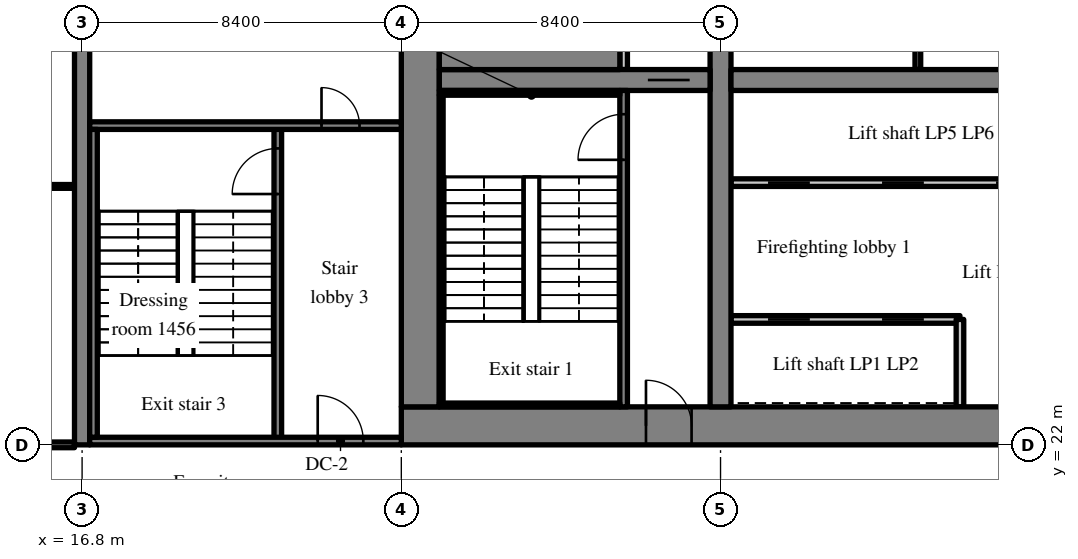
"""IFC4 building model, lengths in metres.
Left out: names, types, materials, properties, quantities, classifications, styles, units other than length and angle.
Written with IfcOpenShell. Run it as: python <this file> out.ifc"""

import sys

from ifc_helpers import new_model, si_unit, direction, frame, frame_2d, origin, place, context, subcontext, project, spatial, rectangle, extrude, source, transform, mapped, element, fill, save


model = new_model("IFC4")
c1 = context("Model", 3, precision=1e-05, world=origin(), true_north=direction((0.0, 1.0)))
c2 = subcontext(c1, "Body", "Model", "MODEL_VIEW")
j1 = project(units=[si_unit("LENGTHUNIT", "METRE"), si_unit("PLANEANGLEUNIT", "RADIAN")], contexts=[c1])
p1 = place(None, origin())
s1 = spatial("IfcSite", under=j1, at=p1, CompositionType="ELEMENT")
p2 = place(p1, origin())
s2 = spatial("IfcBuilding", under=s1, at=p2, CompositionType="ELEMENT")
p3 = place(p2, frame((0.0, 0.0, 62.0)))
s3 = spatial("IfcBuildingStorey", under=s2, at=p3, CompositionType="ELEMENT", Elevation=62.0)
m1 = source(origin(), c2, "Body", "SweptSolid", [
    extrude(rectangle(XDim=50.4, YDim=1.0, at=frame_2d((25.2, 0.0))), origin(), (0.0, 0.0, 1.0), 3.52),
])
p4 = place(p3, frame((25.2, 22.5, 0.0), z_axis=(0.0, 0.0, 1.0), x_axis=(1.0, 0.0, 0.0)))
e1 = element("IfcWall", 1, at=p4, inside=s3, PredefinedType="SHEAR", context=c2, shape_type="MappedRepresentation", body=[
    mapped(m1, transform((0.0, 0.0, 0.0), scale=1.0)),
])
m2 = source(origin(), c2, "Body", "SweptSolid", [
    extrude(rectangle(XDim=1.8, YDim=2.1, at=frame_2d((0.9, 1.05))), frame((0.0, 0.51, 0.0), z_axis=(0.0, -1.0, 0.0), x_axis=(1.0, 0.0, 0.0)), (0.0, 0.0, 1.0), 1.02),
])
p5 = place(p4, frame((15.9, 0.0, 0.0)))
e2 = element("IfcOpeningElement", 2, at=p5, cuts=e1, PredefinedType="OPENING", context=c2, shape_type="MappedRepresentation", body=[
    mapped(m2, transform((0.0, 0.0, 0.0), scale=1.0)),
])
m3 = source(origin(), c2, "Body", "SweptSolid", [
    extrude(rectangle(XDim=1.2, YDim=2.1, at=frame_2d((0.6, 1.05))), frame((0.0, 0.51, 0.0), z_axis=(0.0, -1.0, 0.0), x_axis=(1.0, 0.0, 0.0)), (0.0, 0.0, 1.0), 1.02),
])
p6 = place(p4, frame((26.987, 0.0, 0.0)))
e3 = element("IfcOpeningElement", 3, at=p6, cuts=e1, PredefinedType="OPENING", context=c2, shape_type="MappedRepresentation", body=[
    mapped(m3, transform((0.0, 0.0, 0.0), scale=1.0)),
])
m4 = source(origin(), c2, "Body", "SweptSolid", [
    extrude(rectangle(XDim=0.9, YDim=2.1, at=frame_2d((0.45, 1.05))), frame((0.0, 0.51, 0.0), z_axis=(0.0, -1.0, 0.0), x_axis=(1.0, 0.0, 0.0)), (0.0, 0.0, 1.0), 1.02),
])
p7 = place(p4, frame((34.5, 0.0, 0.0)))
e4 = element("IfcOpeningElement", 4, at=p7, cuts=e1, PredefinedType="OPENING", context=c2, shape_type="MappedRepresentation", body=[
    mapped(m4, transform((0.0, 0.0, 0.0), scale=1.0)),
])
p8 = place(p4, frame((31.5, 0.0, 0.0)))
e5 = element("IfcOpeningElement", 5, at=p8, cuts=e1, PredefinedType="OPENING", context=c2, shape_type="MappedRepresentation", body=[
    mapped(m4, transform((0.0, 0.0, 0.0), scale=1.0)),
])
p9 = place(p4, frame((39.769, 0.0, 0.0)))
e6 = element("IfcOpeningElement", 6, at=p9, cuts=e1, PredefinedType="OPENING", context=c2, shape_type="MappedRepresentation", body=[
    mapped(m4, transform((0.0, 0.0, 0.0), scale=1.0)),
])
p10 = place(p4, frame((36.756, 0.0, 0.0)))
e7 = element("IfcOpeningElement", 7, at=p10, cuts=e1, PredefinedType="OPENING", context=c2, shape_type="MappedRepresentation", body=[
    mapped(m4, transform((0.0, 0.0, 0.0), scale=1.0)),
])
p11 = place(p4, frame((6.438, 0.0, 0.0)))
e8 = element("IfcOpeningElement", 8, at=p11, cuts=e1, PredefinedType="OPENING", context=c2, shape_type="MappedRepresentation", body=[
    mapped(m3, transform((0.0, 0.0, 0.0), scale=1.0)),
])
p12 = place(p4, frame((47.725, 0.0, 0.0)))
e9 = element("IfcOpeningElement", 9, at=p12, cuts=e1, PredefinedType="OPENING", context=c2, shape_type="MappedRepresentation", body=[
    mapped(m3, transform((0.0, 0.0, 0.0), scale=1.0)),
])
m5 = source(origin(), c2, "Body", "SweptSolid", [
    extrude(rectangle(XDim=18.0, YDim=1.0, at=frame_2d((9.0, 0.0))), origin(), (0.0, 0.0, 1.0), 3.52),
])
p13 = place(p3, frame((25.7, 23.0, 0.0), z_axis=(0.0, 0.0, 1.0), x_axis=(0.0, 1.0, 0.0)))
e10 = element("IfcWall", 10, at=p13, inside=s3, PredefinedType="SHEAR", context=c2, shape_type="MappedRepresentation", body=[
    mapped(m5, transform((0.0, 0.0, 0.0), scale=1.0)),
])
m6 = source(origin(), c2, "Body", "SweptSolid", [
    extrude(rectangle(XDim=18.0, YDim=0.55, at=frame_2d((9.0, 0.0))), origin(), (0.0, 0.0, 1.0), 3.52),
])
p14 = place(p3, frame((33.6, 23.0, 0.0), z_axis=(0.0, 0.0, 1.0), x_axis=(0.0, 1.0, 0.0)))
e11 = element("IfcWall", 11, at=p14, inside=s3, PredefinedType="SHEAR", context=c2, shape_type="MappedRepresentation", body=[
    mapped(m6, transform((0.0, 0.0, 0.0), scale=1.0)),
])
m7 = source(origin(), c2, "Body", "SweptSolid", [
    extrude(rectangle(XDim=1.1, YDim=2.1, at=frame_2d((0.55, 1.05))), frame((0.0, 0.285, 0.0), z_axis=(0.0, -1.0, 0.0), x_axis=(1.0, 0.0, 0.0)), (0.0, 0.0, 1.0), 0.57),
])
p15 = place(p14, frame((12.45, 0.0, 0.0)))
e12 = element("IfcOpeningElement", 12, at=p15, cuts=e11, PredefinedType="OPENING", context=c2, shape_type="MappedRepresentation", body=[
    mapped(m7, transform((0.0, 0.0, 0.0), scale=1.0)),
])
m8 = source(origin(), c2, "Body", "SweptSolid", [
    extrude(rectangle(XDim=7.125, YDim=0.55, at=frame_2d((3.562, 0.0))), origin(), (0.0, 0.0, 1.0), 3.52),
])
p16 = place(p3, frame((26.2, 31.6, 0.0), z_axis=(0.0, 0.0, 1.0), x_axis=(1.0, 0.0, 0.0)))
e13 = element("IfcWall", 13, at=p16, inside=s3, PredefinedType="SHEAR", context=c2, shape_type="MappedRepresentation", body=[
    mapped(m8, transform((0.0, 0.0, 0.0), scale=1.0)),
])
p17 = place(p16, frame((5.488, 0.0, 0.0)))
e14 = element("IfcOpeningElement", 14, at=p17, cuts=e13, PredefinedType="OPENING", context=c2, shape_type="MappedRepresentation", body=[
    mapped(m7, transform((0.0, 0.0, 0.0), scale=1.0)),
])
m9 = source(origin(), c2, "Body", "SweptSolid", [
    extrude(rectangle(XDim=16.25, YDim=0.55, at=frame_2d((8.125, 0.0))), origin(), (0.0, 0.0, 1.0), 3.52),
])
p18 = place(p3, frame((33.875, 31.6, 0.0), z_axis=(0.0, 0.0, 1.0), x_axis=(1.0, 0.0, 0.0)))
e15 = element("IfcWall", 15, at=p18, inside=s3, PredefinedType="SHEAR", context=c2, shape_type="MappedRepresentation", body=[
    mapped(m9, transform((0.0, 0.0, 0.0), scale=1.0)),
])
m10 = source(origin(), c2, "Body", "SweptSolid", [
    extrude(rectangle(XDim=1.0, YDim=2.1, at=frame_2d((0.5, 1.05))), frame((0.0, 0.285, 0.0), z_axis=(0.0, -1.0, 0.0), x_axis=(1.0, 0.0, 0.0)), (0.0, 0.0, 1.0), 0.57),
])
p19 = place(p18, frame((14.687, 0.0, 0.0)))
e16 = element("IfcOpeningElement", 16, at=p19, cuts=e15, PredefinedType="OPENING", context=c2, shape_type="MappedRepresentation", body=[
    mapped(m10, transform((0.0, 0.0, 0.0), scale=1.0)),
])
m11 = source(origin(), c2, "Body", "SweptSolid", [
    extrude(rectangle(XDim=20.0, YDim=0.4, at=frame_2d((10.0, 0.0))), origin(), (0.0, 0.0, 1.0), 3.52),
])
p20 = place(p3, frame((16.8, 22.0, 0.0), z_axis=(0.0, 0.0, 1.0), x_axis=(0.0, 1.0, 0.0)))
e17 = element("IfcWall", 17, at=p20, inside=s3, PredefinedType="SHEAR", context=c2, shape_type="MappedRepresentation", body=[
    mapped(m11, transform((0.0, 0.0, 0.0), scale=1.0)),
])
m12 = source(origin(), c2, "Body", "SweptSolid", [
    extrude(rectangle(XDim=6.025, YDim=0.2, at=frame_2d((3.012, 0.0))), origin(), (0.0, 0.0, 1.0), 3.52),
])
p21 = place(p3, frame((33.875, 25.3, 0.0), z_axis=(0.0, 0.0, 1.0), x_axis=(1.0, 0.0, 0.0)))
e18 = element("IfcWall", 18, at=p21, inside=s3, PredefinedType="SOLIDWALL", context=c2, shape_type="MappedRepresentation", body=[
    mapped(m12, transform((0.0, 0.0, 0.0), scale=1.0)),
])
m13 = source(origin(), c2, "Body", "SweptSolid", [
    extrude(rectangle(XDim=1.1, YDim=2.1, at=frame_2d((0.55, 1.05))), frame((0.0, 0.11, 0.0), z_axis=(0.0, -1.0, 0.0), x_axis=(1.0, 0.0, 0.0)), (0.0, 0.0, 1.0), 0.22),
])
p22 = place(p21, frame((0.975, 0.0, 0.0)))
e19 = element("IfcOpeningElement", 19, at=p22, cuts=e18, PredefinedType="OPENING", context=c2, shape_type="MappedRepresentation", body=[
    mapped(m13, transform((0.0, 0.0, 0.0), scale=1.0)),
])
p23 = place(p21, frame((3.975, 0.0, 0.0)))
e20 = element("IfcOpeningElement", 20, at=p23, cuts=e18, PredefinedType="OPENING", context=c2, shape_type="MappedRepresentation", body=[
    mapped(m13, transform((0.0, 0.0, 0.0), scale=1.0)),
])
m14 = source(origin(), c2, "Body", "SweptSolid", [
    extrude(rectangle(XDim=12.025, YDim=0.2, at=frame_2d((6.012, 0.0))), origin(), (0.0, 0.0, 1.0), 3.52),
])
p24 = place(p3, frame((33.875, 28.9, 0.0), z_axis=(0.0, 0.0, 1.0), x_axis=(1.0, 0.0, 0.0)))
e21 = element("IfcWall", 21, at=p24, inside=s3, PredefinedType="SOLIDWALL", context=c2, shape_type="MappedRepresentation", body=[
    mapped(m14, transform((0.0, 0.0, 0.0), scale=1.0)),
])
p25 = place(p24, frame((0.975, 0.0, 0.0)))
e22 = element("IfcOpeningElement", 22, at=p25, cuts=e21, PredefinedType="OPENING", context=c2, shape_type="MappedRepresentation", body=[
    mapped(m13, transform((0.0, 0.0, 0.0), scale=1.0)),
])
p26 = place(p24, frame((3.975, 0.0, 0.0)))
e23 = element("IfcOpeningElement", 23, at=p26, cuts=e21, PredefinedType="OPENING", context=c2, shape_type="MappedRepresentation", body=[
    mapped(m13, transform((0.0, 0.0, 0.0), scale=1.0)),
])
p27 = place(p24, frame((6.975, 0.0, 0.0)))
e24 = element("IfcOpeningElement", 24, at=p27, cuts=e21, PredefinedType="OPENING", context=c2, shape_type="MappedRepresentation", body=[
    mapped(m13, transform((0.0, 0.0, 0.0), scale=1.0)),
])
p28 = place(p24, frame((9.975, 0.0, 0.0)))
e25 = element("IfcOpeningElement", 25, at=p28, cuts=e21, PredefinedType="OPENING", context=c2, shape_type="MappedRepresentation", body=[
    mapped(m13, transform((0.0, 0.0, 0.0), scale=1.0)),
])
m15 = source(origin(), c2, "Body", "SweptSolid", [
    extrude(rectangle(XDim=2.3, YDim=0.2, at=frame_2d((1.15, 0.0))), origin(), (0.0, 0.0, 1.0), 3.52),
])
p29 = place(p3, frame((39.9, 23.0, 0.0), z_axis=(0.0, 0.0, 1.0), x_axis=(0.0, 1.0, 0.0)))
e26 = element("IfcWall", 26, at=p29, inside=s3, PredefinedType="SOLIDWALL", context=c2, shape_type="MappedRepresentation", body=[
    mapped(m15, transform((0.0, 0.0, 0.0), scale=1.0)),
])
m16 = source(origin(), c2, "Body", "SweptSolid", [
    extrude(rectangle(XDim=3.125, YDim=0.15, at=frame_2d((1.562, 0.0))), origin(), (0.0, 0.0, 1.0), 3.52),
])
p30 = place(p3, frame((38.792, 31.875, 0.0), z_axis=(0.0, 0.0, 1.0), x_axis=(0.0, 1.0, 0.0)))
e27 = element("IfcWall", 27, at=p30, inside=s3, PredefinedType="PARTITIONING", context=c2, shape_type="MappedRepresentation", body=[
    mapped(m16, transform((0.0, 0.0, 0.0), scale=1.0)),
])
m17 = source(origin(), c2, "Body", "SweptSolid", [
    extrude(rectangle(XDim=8.325, YDim=0.2, at=frame_2d((4.163, 0.0))), origin(), (0.0, 0.0, 1.0), 3.52),
])
p31 = place(p3, frame((31.05, 23.0, 0.0), z_axis=(0.0, 0.0, 1.0), x_axis=(0.0, 1.0, 0.0)))
e28 = element("IfcWall", 28, at=p31, inside=s3, PredefinedType="SOLIDWALL", context=c2, shape_type="MappedRepresentation", body=[
    mapped(m17, transform((0.0, 0.0, 0.0), scale=1.0)),
])
m18 = source(origin(), c2, "Body", "SweptSolid", [
    extrude(rectangle(XDim=1.2, YDim=2.1, at=frame_2d((0.6, 1.05))), frame((0.0, 0.11, 0.0), z_axis=(0.0, -1.0, 0.0), x_axis=(1.0, 0.0, 0.0)), (0.0, 0.0, 1.0), 0.22),
])
p32 = place(p31, frame((6.5, 0.0, 0.0)))
e29 = element("IfcOpeningElement", 29, at=p32, cuts=e28, PredefinedType="OPENING", context=c2, shape_type="MappedRepresentation", body=[
    mapped(m18, transform((0.0, 0.0, 0.0), scale=1.0)),
])
m19 = source(origin(), c2, "Body", "SweptSolid", [
    extrude(rectangle(XDim=1.725, YDim=0.2, at=frame_2d((0.863, 0.0))), origin(), (0.0, 0.0, 1.0), 3.52),
])
p33 = place(p3, frame((31.05, 31.875, 0.0), z_axis=(0.0, 0.0, 1.0), x_axis=(0.0, 1.0, 0.0)))
e30 = element("IfcWall", 30, at=p33, inside=s3, PredefinedType="SOLIDWALL", context=c2, shape_type="MappedRepresentation", body=[
    mapped(m19, transform((0.0, 0.0, 0.0), scale=1.0)),
])
m20 = source(origin(), c2, "Body", "SweptSolid", [
    extrude(rectangle(XDim=8.3, YDim=0.2, at=frame_2d((4.15, 0.0))), origin(), (0.0, 0.0, 1.0), 3.52),
])
p34 = place(p3, frame((21.95, 22.1, 0.0), z_axis=(0.0, 0.0, 1.0), x_axis=(0.0, 1.0, 0.0)))
e31 = element("IfcWall", 31, at=p34, inside=s3, PredefinedType="SOLIDWALL", context=c2, shape_type="MappedRepresentation", body=[
    mapped(m20, transform((0.0, 0.0, 0.0), scale=1.0)),
])
p35 = place(p34, frame((6.5, 0.0, 0.0)))
e32 = element("IfcOpeningElement", 32, at=p35, cuts=e31, PredefinedType="OPENING", context=c2, shape_type="MappedRepresentation", body=[
    mapped(m18, transform((0.0, 0.0, 0.0), scale=1.0)),
])
m21 = source(origin(), c2, "Body", "SweptSolid", [
    extrude(rectangle(XDim=8.2, YDim=0.2, at=frame_2d((4.1, 0.0))), origin(), (0.0, 0.0, 1.0), 3.52),
])
p36 = place(p3, frame((17.0, 22.1, 0.0), z_axis=(0.0, 0.0, 1.0), x_axis=(1.0, 0.0, 0.0)))
e33 = element("IfcWall", 33, at=p36, inside=s3, PredefinedType="SOLIDWALL", context=c2, shape_type="MappedRepresentation", body=[
    mapped(m21, transform((0.0, 0.0, 0.0), scale=1.0)),
])
p37 = place(p36, frame((6.0, 0.0, 0.0)))
e34 = element("IfcOpeningElement", 34, at=p37, cuts=e33, PredefinedType="OPENING", context=c2, shape_type="MappedRepresentation", body=[
    mapped(m18, transform((0.0, 0.0, 0.0), scale=1.0)),
])
p38 = place(p3, frame((17.0, 30.4, 0.0), z_axis=(0.0, 0.0, 1.0), x_axis=(1.0, 0.0, 0.0)))
e35 = element("IfcWall", 35, at=p38, inside=s3, PredefinedType="SOLIDWALL", context=c2, shape_type="MappedRepresentation", body=[
    mapped(m21, transform((0.0, 0.0, 0.0), scale=1.0)),
])
m22 = source(origin(), c2, "Body", "SweptSolid", [
    extrude(rectangle(XDim=1.0, YDim=2.1, at=frame_2d((0.5, 1.05))), frame((0.0, 0.11, 0.0), z_axis=(0.0, -1.0, 0.0), x_axis=(1.0, 0.0, 0.0)), (0.0, 0.0, 1.0), 0.22),
])
p39 = place(p38, frame((6.1, 0.0, 0.0)))
e36 = element("IfcOpeningElement", 36, at=p39, cuts=e35, PredefinedType="OPENING", context=c2, shape_type="MappedRepresentation", body=[
    mapped(m22, transform((0.0, 0.0, 0.0), scale=1.0)),
])
m23 = source(origin(), c2, "Body", "SweptSolid", [
    extrude(rectangle(XDim=4.75, YDim=0.1, at=frame_2d((2.375, 0.0))), origin(), (0.0, 0.0, 1.0), 3.52),
])
p40 = place(p3, frame((26.2, 23.05, 0.0), z_axis=(0.0, 0.0, 1.0), x_axis=(1.0, 0.0, 0.0)))
e37 = element("IfcWall", 37, at=p40, inside=s3, PredefinedType="SOLIDWALL", context=c2, shape_type="MappedRepresentation", body=[
    mapped(m23, transform((0.0, 0.0, 0.0), scale=1.0)),
])
m24 = source(origin(), c2, "Body", "SweptSolid", [
    extrude(rectangle(XDim=4.75, YDim=0.125, at=frame_2d((2.375, 0.0))), origin(), (0.0, 0.0, 1.0), 3.52),
])
p41 = place(p3, frame((26.2, 31.262, 0.0), z_axis=(0.0, 0.0, 1.0), x_axis=(1.0, 0.0, 0.0)))
e38 = element("IfcWall", 38, at=p41, inside=s3, PredefinedType="SOLIDWALL", context=c2, shape_type="MappedRepresentation", body=[
    mapped(m24, transform((0.0, 0.0, 0.0), scale=1.0)),
])
m25 = source(origin(), c2, "Body", "SweptSolid", [
    extrude(rectangle(XDim=8.1, YDim=0.1, at=frame_2d((4.05, 0.0))), origin(), (0.0, 0.0, 1.0), 3.52),
])
p42 = place(p3, frame((26.25, 23.1, 0.0), z_axis=(0.0, 0.0, 1.0), x_axis=(0.0, 1.0, 0.0)))
e39 = element("IfcWall", 39, at=p42, inside=s3, PredefinedType="SOLIDWALL", context=c2, shape_type="MappedRepresentation", body=[
    mapped(m25, transform((0.0, 0.0, 0.0), scale=1.0)),
])
m26 = source(origin(), c2, "Body", "SweptSolid", [
    extrude(rectangle(XDim=8.1, YDim=0.2, at=frame_2d((4.05, 0.0))), origin(), (0.0, 0.0, 1.0), 3.52),
])
p43 = place(p3, frame((17.1, 22.2, 0.0), z_axis=(0.0, 0.0, 1.0), x_axis=(0.0, 1.0, 0.0)))
e40 = element("IfcWall", 40, at=p43, inside=s3, PredefinedType="SOLIDWALL", context=c2, shape_type="MappedRepresentation", body=[
    mapped(m26, transform((0.0, 0.0, 0.0), scale=1.0)),
])
m27 = source(origin(), c2, "Body", "SweptSolid", [
    extrude(rectangle(XDim=4.75, YDim=0.925, at=frame_2d((2.375, 0.0))), origin(), (0.0, 0.0, 1.0), 3.52),
])
p44 = place(p3, frame((26.2, 32.337, 0.0), z_axis=(0.0, 0.0, 1.0), x_axis=(1.0, 0.0, 0.0)))
e41 = element("IfcWall", 41, at=p44, inside=s3, PredefinedType="SOLIDWALL", context=c2, shape_type="MappedRepresentation", body=[
    mapped(m27, transform((0.0, 0.0, 0.0), scale=1.0)),
])
m28 = source(origin(), c2, "Body", "SweptSolid", [
    extrude(rectangle(XDim=2.25, YDim=0.1, at=frame_2d((1.125, 0.0))), origin(), (0.0, 0.0, 1.0), 3.52),
])
p45 = place(p3, frame((14.35, 28.8, 0.0), z_axis=(0.0, 0.0, 1.0), x_axis=(1.0, 0.0, 0.0)))
e42 = element("IfcWall", 42, at=p45, inside=s3, PredefinedType="PARTITIONING", context=c2, shape_type="MappedRepresentation", body=[
    mapped(m28, transform((0.0, 0.0, 0.0), scale=1.0)),
])
m29 = source(origin(), c2, "Body", "SweptSolid", [
    extrude(rectangle(XDim=0.9, YDim=2.1, at=frame_2d((0.45, 1.05))), frame((0.0, 0.06, 0.0), z_axis=(0.0, -1.0, 0.0), x_axis=(1.0, 0.0, 0.0)), (0.0, 0.0, 1.0), 0.12),
])
p46 = place(p45, frame((0.675, 0.0, 0.0)))
e43 = element("IfcOpeningElement", 43, at=p46, cuts=e42, PredefinedType="OPENING", context=c2, shape_type="MappedRepresentation", body=[
    mapped(m29, transform((0.0, 0.0, 0.0), scale=1.0)),
])
m30 = source(origin(), c2, "Body", "SweptSolid", [
    extrude(rectangle(XDim=8.0, YDim=0.15, at=frame_2d((4.0, 0.0))), origin(), (0.0, 0.0, 1.0), 2.82),
])
p47 = place(p3, frame((8.6, 22.0, 0.0), z_axis=(0.0, 0.0, 1.0), x_axis=(1.0, 0.0, 0.0)))
e44 = element("IfcWall", 44, at=p47, inside=s3, PredefinedType="PARTITIONING", context=c2, shape_type="MappedRepresentation", body=[
    mapped(m30, transform((0.0, 0.0, 0.0), scale=1.0)),
])
m31 = source(origin(), c2, "Body", "SweptSolid", [
    extrude(rectangle(XDim=1.0, YDim=2.1, at=frame_2d((0.5, 1.05))), frame((0.0, 0.085, 0.0), z_axis=(0.0, -1.0, 0.0), x_axis=(1.0, 0.0, 0.0)), (0.0, 0.0, 1.0), 0.17),
])
p48 = place(p47, frame((0.55, 0.0, 0.0)))
e45 = element("IfcOpeningElement", 45, at=p48, cuts=e44, PredefinedType="OPENING", context=c2, shape_type="MappedRepresentation", body=[
    mapped(m31, transform((0.0, 0.0, 0.0), scale=1.0)),
])
m32 = source(origin(), c2, "Body", "SweptSolid", [
    extrude(rectangle(XDim=1.1, YDim=2.1, at=frame_2d((0.55, 1.05))), frame((0.0, 0.025, 0.0), z_axis=(0.0, -1.0, 0.0), x_axis=(1.0, 0.0, 0.0)), (0.0, 0.0, 1.0), 0.05),
])
p49 = place(p22, origin())
e46 = element("IfcDoor", 46, at=p49, inside=s3, OperationType="SLIDING_TO_LEFT", PredefinedType="DOOR", context=c2, shape_type="MappedRepresentation", body=[
    mapped(m32, transform((0.0, 0.0, 0.0), scale=1.0)),
])
fill(e19, e46)
p50 = place(p23, origin())
e47 = element("IfcDoor", 47, at=p50, inside=s3, OperationType="SLIDING_TO_RIGHT", PredefinedType="DOOR", context=c2, shape_type="MappedRepresentation", body=[
    mapped(m32, transform((0.0, 0.0, 0.0), scale=1.0)),
])
fill(e20, e47)
p51 = place(p25, origin())
e48 = element("IfcDoor", 48, at=p51, inside=s3, OperationType="SLIDING_TO_LEFT", PredefinedType="DOOR", context=c2, shape_type="MappedRepresentation", body=[
    mapped(m32, transform((0.0, 0.0, 0.0), scale=1.0)),
])
fill(e22, e48)
p52 = place(p26, origin())
e49 = element("IfcDoor", 49, at=p52, inside=s3, OperationType="SLIDING_TO_RIGHT", PredefinedType="DOOR", context=c2, shape_type="MappedRepresentation", body=[
    mapped(m32, transform((0.0, 0.0, 0.0), scale=1.0)),
])
fill(e23, e49)
p53 = place(p27, origin())
e50 = element("IfcDoor", 50, at=p53, inside=s3, OperationType="SLIDING_TO_LEFT", PredefinedType="DOOR", context=c2, shape_type="MappedRepresentation", body=[
    mapped(m32, transform((0.0, 0.0, 0.0), scale=1.0)),
])
fill(e24, e50)
m33 = source(origin(), c2, "Body", "SweptSolid", [
    extrude(rectangle(XDim=1.2, YDim=2.1, at=frame_2d((0.6, 1.05))), frame((0.0, 0.025, 0.0), z_axis=(0.0, -1.0, 0.0), x_axis=(1.0, 0.0, 0.0)), (0.0, 0.0, 1.0), 0.05),
])
p54 = place(p32, origin())
e51 = element("IfcDoor", 51, at=p54, inside=s3, OperationType="SINGLE_SWING_LEFT", PredefinedType="DOOR", context=c2, shape_type="MappedRepresentation", body=[
    mapped(m33, transform((0.0, 0.0, 0.0), scale=1.0)),
])
fill(e29, e51)
m34 = source(origin(), c2, "Body", "SweptSolid", [
    extrude(rectangle(XDim=1.2, YDim=2.1, at=frame_2d((0.6, 1.05))), frame((0.0, 0.375, 0.0), z_axis=(0.0, -1.0, 0.0), x_axis=(1.0, 0.0, 0.0)), (0.0, 0.0, 1.0), 0.05),
])
p55 = place(p11, origin())
e52 = element("IfcDoor", 52, at=p55, inside=s3, OperationType="SINGLE_SWING_LEFT", PredefinedType="DOOR", context=c2, shape_type="MappedRepresentation", body=[
    mapped(m34, transform((0.0, 0.0, 0.0), scale=1.0)),
])
fill(e8, e52)
p56 = place(p17, origin())
e53 = element("IfcDoor", 53, at=p56, inside=s3, OperationType="SLIDING_TO_RIGHT", PredefinedType="DOOR", context=c2, shape_type="MappedRepresentation", body=[
    mapped(m32, transform((0.0, 0.0, 0.0), scale=1.0)),
])
fill(e14, e53)
p57 = place(p35, origin())
e54 = element("IfcDoor", 54, at=p57, inside=s3, OperationType="SINGLE_SWING_LEFT", PredefinedType="DOOR", context=c2, shape_type="MappedRepresentation", body=[
    mapped(m33, transform((0.0, 0.0, 0.0), scale=1.0)),
])
fill(e32, e54)
p58 = place(p37, origin())
e55 = element("IfcDoor", 55, at=p58, inside=s3, OperationType="SINGLE_SWING_LEFT", PredefinedType="DOOR", context=c2, shape_type="MappedRepresentation", body=[
    mapped(m33, transform((0.0, 0.0, 0.0), scale=1.0)),
])
fill(e34, e55)
m35 = source(origin(), c2, "Body", "SweptSolid", [
    extrude(rectangle(XDim=1.0, YDim=2.1, at=frame_2d((0.5, 1.05))), frame((0.0, 0.025, 0.0), z_axis=(0.0, -1.0, 0.0), x_axis=(1.0, 0.0, 0.0)), (0.0, 0.0, 1.0), 0.05),
])
p59 = place(p39, origin())
e56 = element("IfcDoor", 56, at=p59, inside=s3, OperationType="SINGLE_SWING_LEFT", PredefinedType="DOOR", context=c2, shape_type="MappedRepresentation", body=[
    mapped(m35, transform((0.0, 0.0, 0.0), scale=1.0)),
])
fill(e36, e56)
save(model, sys.argv[1])
